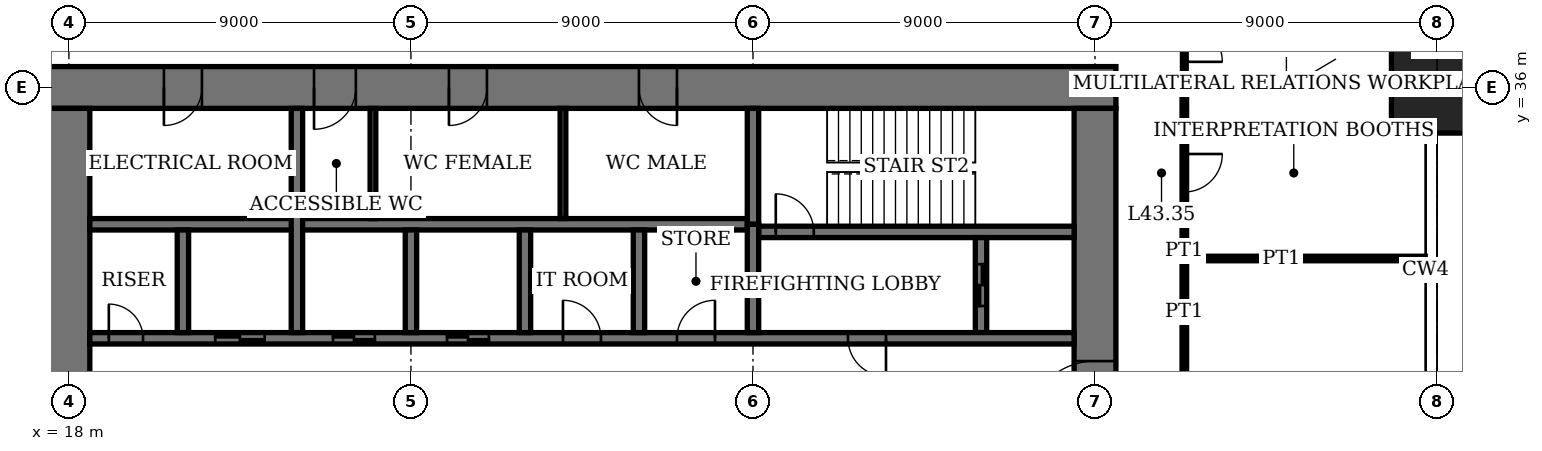
"""IFC4 building model, lengths in metres.
Left out: names, types, materials, properties, quantities, classifications, styles, units other than length and angle.
Written with IfcOpenShell. Run it as: python <this file> out.ifc"""

import sys

from ifc_helpers import new_model, si_unit, direction, frame, frame_2d, origin, origin_2d, place, context, subcontext, project, spatial, rectangle, extrude, element, fill, save


model = new_model("IFC4")
c1 = context("Model", 3, precision=1e-05, world=origin(), true_north=direction((0.0, 1.0)))
c2 = subcontext(c1, "Body", "Model", "MODEL_VIEW")
j1 = project(units=[si_unit("LENGTHUNIT", "METRE"), si_unit("PLANEANGLEUNIT", "RADIAN")], contexts=[c1])
p1 = place(None, origin())
s1 = spatial("IfcSite", under=j1, at=p1, CompositionType="ELEMENT")
p2 = place(p1, origin())
s2 = spatial("IfcBuilding", under=s1, at=p2, CompositionType="ELEMENT")
p3 = place(p2, frame((0.0, 0.0, 178.2)))
s3 = spatial("IfcBuildingStorey", under=s2, at=p3, CompositionType="ELEMENT", Elevation=178.2)
p4 = place(p3, frame((54.0, 36.0, 0.0), z_axis=(0.0, 0.0, 1.0), x_axis=(1.0, 0.0, 0.0)))
e1 = element("IfcColumn", 1, at=p4, inside=s3, PredefinedType="COLUMN", context=c2, shape_type="SweptSolid", body=[
    extrude(rectangle(XDim=2.4, YDim=2.4, at=origin_2d()), origin(), (0.0, 0.0, 1.0), 4.0),
])
p5 = place(p3, frame((45.55, 36.0, 0.0), z_axis=(0.0, 0.0, 1.0), x_axis=(-1.0, 0.0, 0.0)))
e2 = element("IfcWall", 2, at=p5, inside=s3, PredefinedType="SHEAR", context=c2, shape_type="SweptSolid", body=[
    extrude(rectangle(XDim=28.1, YDim=1.1, at=frame_2d((14.05, 0.0))), origin(), (0.0, 0.0, 1.0), 4.0),
])
p6 = place(p5, frame((11.55, 0.0, 0.0)))
e3 = element("IfcOpeningElement", 3, at=p6, cuts=e2, PredefinedType="OPENING", context=c2, shape_type="SweptSolid", body=[
    extrude(rectangle(XDim=1.0, YDim=2.4, at=frame_2d((0.5, 1.2))), frame((0.0, 0.56, 0.0), z_axis=(0.0, -1.0, 0.0), x_axis=(1.0, 0.0, 0.0)), (0.0, 0.0, 1.0), 1.12),
])
p7 = place(p5, frame((16.55, 0.0, 0.0)))
e4 = element("IfcOpeningElement", 4, at=p7, cuts=e2, PredefinedType="OPENING", context=c2, shape_type="SweptSolid", body=[
    extrude(rectangle(XDim=1.0, YDim=2.4, at=frame_2d((0.5, 1.2))), frame((0.0, 0.56, 0.0), z_axis=(0.0, -1.0, 0.0), x_axis=(1.0, 0.0, 0.0)), (0.0, 0.0, 1.0), 1.12),
])
p8 = place(p5, frame((20.0, 0.0, 0.0)))
e5 = element("IfcOpeningElement", 5, at=p8, cuts=e2, PredefinedType="OPENING", context=c2, shape_type="SweptSolid", body=[
    extrude(rectangle(XDim=1.1, YDim=2.4, at=frame_2d((0.55, 1.2))), frame((0.0, 0.56, 0.0), z_axis=(0.0, -1.0, 0.0), x_axis=(1.0, 0.0, 0.0)), (0.0, 0.0, 1.0), 1.12),
])
p9 = place(p5, frame((24.05, 0.0, 0.0)))
e6 = element("IfcOpeningElement", 6, at=p9, cuts=e2, PredefinedType="OPENING", context=c2, shape_type="SweptSolid", body=[
    extrude(rectangle(XDim=1.0, YDim=2.4, at=frame_2d((0.5, 1.2))), frame((0.0, 0.56, 0.0), z_axis=(0.0, -1.0, 0.0), x_axis=(1.0, 0.0, 0.0)), (0.0, 0.0, 1.0), 1.12),
])
p10 = place(p3, frame((18.0, 35.45, 0.0), z_axis=(0.0, 0.0, 1.0), x_axis=(0.0, -1.0, 0.0)))
e7 = element("IfcWall", 7, at=p10, inside=s3, PredefinedType="SHEAR", context=c2, shape_type="SweptSolid", body=[
    extrude(rectangle(XDim=16.9, YDim=1.1, at=frame_2d((8.45, 0.0))), origin(), (0.0, 0.0, 1.0), 4.0),
])
p11 = place(p10, frame((8.45, 0.0, 0.0)))
e8 = element("IfcOpeningElement", 8, at=p11, cuts=e7, PredefinedType="OPENING", context=c2, shape_type="SweptSolid", body=[
    extrude(rectangle(XDim=1.8, YDim=2.4, at=frame_2d((0.9, 1.2))), frame((0.0, 0.56, 0.0), z_axis=(0.0, -1.0, 0.0), x_axis=(1.0, 0.0, 0.0)), (0.0, 0.0, 1.0), 1.12),
])
p12 = place(p3, frame((45.0, 18.55, 0.0), z_axis=(0.0, 0.0, 1.0), x_axis=(0.0, 1.0, 0.0)))
e9 = element("IfcWall", 9, at=p12, inside=s3, PredefinedType="SHEAR", context=c2, shape_type="SweptSolid", body=[
    extrude(rectangle(XDim=16.9, YDim=1.1, at=frame_2d((8.45, 0.0))), origin(), (0.0, 0.0, 1.0), 4.0),
])
p13 = place(p12, frame((8.45, 0.0, 0.0)))
e10 = element("IfcOpeningElement", 10, at=p13, cuts=e9, PredefinedType="OPENING", context=c2, shape_type="SweptSolid", body=[
    extrude(rectangle(XDim=1.8, YDim=2.4, at=frame_2d((0.9, 1.2))), frame((0.0, 0.56, 0.0), z_axis=(0.0, -1.0, 0.0), x_axis=(1.0, 0.0, 0.0)), (0.0, 0.0, 1.0), 1.12),
])
p14 = place(p3, frame((36.15, 32.2, 0.0), z_axis=(0.0, 0.0, 1.0), x_axis=(1.0, 0.0, 0.0)))
e11 = element("IfcWall", 11, at=p14, inside=s3, PredefinedType="SHEAR", context=c2, shape_type="SweptSolid", body=[
    extrude(rectangle(XDim=8.3, YDim=0.3, at=frame_2d((4.15, 0.0))), origin(), (0.0, 0.0, 1.0), 4.0),
])
p15 = place(p14, frame((0.45, 0.0, 0.0)))
e12 = element("IfcOpeningElement", 12, at=p15, cuts=e11, PredefinedType="OPENING", context=c2, shape_type="SweptSolid", body=[
    extrude(rectangle(XDim=1.0, YDim=2.4, at=frame_2d((0.5, 1.2))), frame((0.0, 0.16, 0.0), z_axis=(0.0, -1.0, 0.0), x_axis=(1.0, 0.0, 0.0)), (0.0, 0.0, 1.0), 0.32),
])
p16 = place(p3, frame((36.0, 32.4, 0.0), z_axis=(0.0, 0.0, 1.0), x_axis=(0.0, 1.0, 0.0)))
e13 = element("IfcWall", 13, at=p16, inside=s3, PredefinedType="SHEAR", context=c2, shape_type="SweptSolid", body=[
    extrude(rectangle(XDim=3.05, YDim=0.3, at=frame_2d((1.525, 0.0))), origin(), (0.0, 0.0, 1.0), 4.0),
])
p17 = place(p3, frame((42.0, 29.55, 0.0), z_axis=(0.0, 0.0, 1.0), x_axis=(0.0, 1.0, 0.0)))
e14 = element("IfcWall", 14, at=p17, inside=s3, PredefinedType="SHEAR", context=c2, shape_type="SweptSolid", body=[
    extrude(rectangle(XDim=2.5, YDim=0.3, at=frame_2d((1.25, 0.0))), origin(), (0.0, 0.0, 1.0), 4.0),
])
p18 = place(p17, frame((0.7, 0.0, 0.0)))
e15 = element("IfcOpeningElement", 15, at=p18, cuts=e14, PredefinedType="OPENING", context=c2, shape_type="SweptSolid", body=[
    extrude(rectangle(XDim=1.1, YDim=2.4, at=frame_2d((0.55, 1.2))), frame((0.0, 0.16, 0.0), z_axis=(0.0, -1.0, 0.0), x_axis=(1.0, 0.0, 0.0)), (0.0, 0.0, 1.0), 0.32),
])
p19 = place(p3, frame((18.55, 29.4, 0.0), z_axis=(0.0, 0.0, 1.0), x_axis=(1.0, 0.0, 0.0)))
e16 = element("IfcWall", 16, at=p19, inside=s3, PredefinedType="SHEAR", context=c2, shape_type="SweptSolid", body=[
    extrude(rectangle(XDim=25.9, YDim=0.3, at=frame_2d((12.95, 0.0))), origin(), (0.0, 0.0, 1.0), 4.0),
])
p20 = place(p19, frame((19.95, 0.0, 0.0)))
e17 = element("IfcOpeningElement", 17, at=p20, cuts=e16, PredefinedType="OPENING", context=c2, shape_type="SweptSolid", body=[
    extrude(rectangle(XDim=1.0, YDim=2.4, at=frame_2d((0.5, 1.2))), frame((0.0, 0.16, 0.0), z_axis=(0.0, -1.0, 0.0), x_axis=(1.0, 0.0, 0.0)), (0.0, 0.0, 1.0), 0.32),
])
p21 = place(p19, frame((0.5, 0.0, 0.0)))
e18 = element("IfcOpeningElement", 18, at=p21, cuts=e16, PredefinedType="OPENING", context=c2, shape_type="SweptSolid", body=[
    extrude(rectangle(XDim=0.9, YDim=2.1, at=frame_2d((0.45, 1.05))), frame((0.0, 0.16, 0.0), z_axis=(0.0, -1.0, 0.0), x_axis=(1.0, 0.0, 0.0)), (0.0, 0.0, 1.0), 0.32),
])
p22 = place(p19, frame((15.45, 0.0, 0.0)))
e19 = element("IfcOpeningElement", 19, at=p22, cuts=e16, PredefinedType="OPENING", context=c2, shape_type="SweptSolid", body=[
    extrude(rectangle(XDim=1.0, YDim=2.4, at=frame_2d((0.5, 1.2))), frame((0.0, 0.16, 0.0), z_axis=(0.0, -1.0, 0.0), x_axis=(1.0, 0.0, 0.0)), (0.0, 0.0, 1.0), 0.32),
])
p23 = place(p19, frame((12.45, 0.0, 0.0)))
e20 = element("IfcOpeningElement", 20, at=p23, cuts=e16, PredefinedType="OPENING", context=c2, shape_type="SweptSolid", body=[
    extrude(rectangle(XDim=1.0, YDim=2.4, at=frame_2d((0.5, 1.2))), frame((0.0, 0.16, 0.0), z_axis=(0.0, -1.0, 0.0), x_axis=(1.0, 0.0, 0.0)), (0.0, 0.0, 1.0), 0.32),
])
p24 = place(p19, frame((9.4, 0.0, 0.0)))
e21 = element("IfcOpeningElement", 21, at=p24, cuts=e16, PredefinedType="OPENING", context=c2, shape_type="SweptSolid", body=[
    extrude(rectangle(XDim=1.1, YDim=2.4, at=frame_2d((0.55, 1.2))), frame((0.0, 0.16, 0.0), z_axis=(0.0, -1.0, 0.0), x_axis=(1.0, 0.0, 0.0)), (0.0, 0.0, 1.0), 0.32),
])
p25 = place(p19, frame((6.4, 0.0, 0.0)))
e22 = element("IfcOpeningElement", 22, at=p25, cuts=e16, PredefinedType="OPENING", context=c2, shape_type="SweptSolid", body=[
    extrude(rectangle(XDim=1.1, YDim=2.4, at=frame_2d((0.55, 1.2))), frame((0.0, 0.16, 0.0), z_axis=(0.0, -1.0, 0.0), x_axis=(1.0, 0.0, 0.0)), (0.0, 0.0, 1.0), 0.32),
])
p26 = place(p19, frame((3.3, 0.0, 0.0)))
e23 = element("IfcOpeningElement", 23, at=p26, cuts=e16, PredefinedType="OPENING", context=c2, shape_type="SweptSolid", body=[
    extrude(rectangle(XDim=1.3, YDim=2.4, at=frame_2d((0.65, 1.2))), frame((0.0, 0.16, 0.0), z_axis=(0.0, -1.0, 0.0), x_axis=(1.0, 0.0, 0.0)), (0.0, 0.0, 1.0), 0.32),
])
p27 = place(p3, frame((18.55, 32.4, 0.0), z_axis=(0.0, 0.0, 1.0), x_axis=(1.0, 0.0, 0.0)))
e24 = element("IfcWall", 24, at=p27, inside=s3, PredefinedType="SHEAR", context=c2, shape_type="SweptSolid", body=[
    extrude(rectangle(XDim=17.3, YDim=0.3, at=frame_2d((8.65, 0.0))), origin(), (0.0, 0.0, 1.0), 4.0),
])
for number, where, z_axis, x_axis in (
    (25, (33.0, 29.55, 0.0), (0.0, 0.0, 1.0), (0.0, 1.0, 0.0)),
    (26, (30.0, 29.55, 0.0), (0.0, 0.0, 1.0), (0.0, 1.0, 0.0)),
    (27, (27.0, 29.55, 0.0), (0.0, 0.0, 1.0), (0.0, 1.0, 0.0)),
):
    element("IfcWall", number, at=place(p3, frame(where, z_axis=z_axis, x_axis=x_axis)), inside=s3, PredefinedType="SHEAR", context=c2, shape_type="SweptSolid", body=[
        extrude(rectangle(XDim=2.7, YDim=0.3, at=frame_2d((1.35, 0.0))), origin(), (0.0, 0.0, 1.0), 4.0),
    ])
p28 = place(p3, frame((24.0, 29.55, 0.0), z_axis=(0.0, 0.0, 1.0), x_axis=(0.0, 1.0, 0.0)))
e28 = element("IfcWall", 28, at=p28, inside=s3, PredefinedType="SHEAR", context=c2, shape_type="SweptSolid", body=[
    extrude(rectangle(XDim=5.9, YDim=0.3, at=frame_2d((2.95, 0.0))), origin(), (0.0, 0.0, 1.0), 4.0),
])
p29 = place(p3, frame((21.0, 29.55, 0.0), z_axis=(0.0, 0.0, 1.0), x_axis=(0.0, 1.0, 0.0)))
e29 = element("IfcWall", 29, at=p29, inside=s3, PredefinedType="SHEAR", context=c2, shape_type="SweptSolid", body=[
    extrude(rectangle(XDim=2.7, YDim=0.3, at=frame_2d((1.35, 0.0))), origin(), (0.0, 0.0, 1.0), 4.0),
])
p30 = place(p3, frame((36.0, 29.55, 0.0), z_axis=(0.0, 0.0, 1.0), x_axis=(0.0, 1.0, 0.0)))
e30 = element("IfcWall", 30, at=p30, inside=s3, PredefinedType="SHEAR", context=c2, shape_type="SweptSolid", body=[
    extrude(rectangle(XDim=2.85, YDim=0.3, at=frame_2d((1.425, 0.0))), origin(), (0.0, 0.0, 1.0), 4.0),
])
p31 = place(p3, frame((47.35, 31.5, 0.0), z_axis=(0.0, 0.0, 1.0), x_axis=(1.0, 0.0, 0.0)))
e31 = element("IfcWall", 31, at=p31, inside=s3, PredefinedType="PARTITIONING", context=c2, shape_type="SweptSolid", body=[
    extrude(rectangle(XDim=6.34, YDim=0.12, at=frame_2d((3.17, 0.0))), origin(), (0.0, 0.0, 1.0), 3.1),
])
p32 = place(p3, frame((47.35, 36.0, 0.0), z_axis=(0.0, 0.0, 1.0), x_axis=(1.0, 0.0, 0.0)))
e32 = element("IfcWall", 32, at=p32, inside=s3, PredefinedType="PARTITIONING", context=c2, shape_type="SweptSolid", body=[
    extrude(rectangle(XDim=5.45, YDim=0.12, at=frame_2d((2.725, 0.0))), origin(), (0.0, 0.0, 1.0), 3.05),
])
p33 = place(p3, frame((47.35, 22.5, 0.0), z_axis=(0.0, 0.0, 1.0), x_axis=(0.0, 1.0, 0.0)))
e33 = element("IfcWall", 33, at=p33, inside=s3, PredefinedType="PARTITIONING", context=c2, shape_type="SweptSolid", body=[
    extrude(rectangle(XDim=9.0, YDim=0.12, at=frame_2d((4.5, 0.0))), origin(), (0.0, 0.0, 1.0), 3.75),
])
p34 = place(p33, frame((4.0, 0.0, 0.0)))
e34 = element("IfcOpeningElement", 34, at=p34, cuts=e33, PredefinedType="OPENING", context=c2, shape_type="SweptSolid", body=[
    extrude(rectangle(XDim=1.0, YDim=2.4, at=frame_2d((0.5, 1.2))), frame((0.0, 0.07, 0.0), z_axis=(0.0, -1.0, 0.0), x_axis=(1.0, 0.0, 0.0)), (0.0, 0.0, 1.0), 0.14),
])
p35 = place(p3, frame((47.35, 31.5, 0.0), z_axis=(0.0, 0.0, 1.0), x_axis=(0.0, 1.0, 0.0)))
e35 = element("IfcWall", 35, at=p35, inside=s3, PredefinedType="PARTITIONING", context=c2, shape_type="SweptSolid", body=[
    extrude(rectangle(XDim=4.5, YDim=0.12, at=frame_2d((2.25, 0.0))), origin(), (0.0, 0.0, 1.0), 3.75),
])
p36 = place(p35, frame((1.75, 0.0, 0.0)))
e36 = element("IfcOpeningElement", 36, at=p36, cuts=e35, PredefinedType="OPENING", context=c2, shape_type="SweptSolid", body=[
    extrude(rectangle(XDim=1.0, YDim=2.4, at=frame_2d((0.5, 1.2))), frame((0.0, 0.07, 0.0), z_axis=(0.0, -1.0, 0.0), x_axis=(1.0, 0.0, 0.0)), (0.0, 0.0, 1.0), 0.14),
])
p37 = place(p3, frame((47.35, 36.0, 0.0), z_axis=(0.0, 0.0, 1.0), x_axis=(0.0, 1.0, 0.0)))
e37 = element("IfcWall", 37, at=p37, inside=s3, PredefinedType="PARTITIONING", context=c2, shape_type="SweptSolid", body=[
    extrude(rectangle(XDim=2.35, YDim=0.1, at=frame_2d((1.175, 0.0))), origin(), (0.0, 0.0, 1.0), 3.75),
])
p38 = place(p37, frame((0.675, 0.0, 0.0)))
e38 = element("IfcOpeningElement", 38, at=p38, cuts=e37, PredefinedType="OPENING", context=c2, shape_type="SweptSolid", body=[
    extrude(rectangle(XDim=1.0, YDim=2.4, at=frame_2d((0.5, 1.2))), frame((0.0, 0.06, 0.0), z_axis=(0.0, -1.0, 0.0), x_axis=(1.0, 0.0, 0.0)), (0.0, 0.0, 1.0), 0.12),
])
for number, where, z_axis, x_axis in (
    (39, (31.0, 32.55, 0.0), (0.0, 0.0, 1.0), (0.0, 1.0, 0.0)),
    (40, (26.0, 32.55, 0.0), (0.0, 0.0, 1.0), (0.0, 1.0, 0.0)),
):
    element("IfcWall", number, at=place(p3, frame(where, z_axis=z_axis, x_axis=x_axis)), inside=s3, PredefinedType="PARTITIONING", context=c2, shape_type="SweptSolid", body=[
        extrude(rectangle(XDim=2.9, YDim=0.15, at=frame_2d((1.45, 0.0))), origin(), (0.0, 0.0, 1.0), 3.75),
    ])
p39 = place(p13, origin())
e41 = element("IfcDoor", 41, at=p39, inside=s3, OperationType="DOUBLE_DOOR_DOUBLE_SWING", PredefinedType="DOOR", context=c2, shape_type="SweptSolid", body=[
    extrude(rectangle(XDim=1.8, YDim=2.4, at=frame_2d((0.9, 1.2))), frame((0.0, 0.03, 0.0), z_axis=(0.0, -1.0, 0.0), x_axis=(1.0, 0.0, 0.0)), (0.0, 0.0, 1.0), 0.06),
    extrude(rectangle(XDim=0.04, YDim=2.4, at=frame_2d((0.02, 1.2))), frame((0.0, 0.55, 0.0), z_axis=(0.0, -1.0, 0.0), x_axis=(1.0, 0.0, 0.0)), (0.0, 0.0, 1.0), 1.1),
    extrude(rectangle(XDim=0.04, YDim=2.4, at=frame_2d((1.78, 1.2))), frame((0.0, 0.55, 0.0), z_axis=(0.0, -1.0, 0.0), x_axis=(1.0, 0.0, 0.0)), (0.0, 0.0, 1.0), 1.1),
    extrude(rectangle(XDim=1.8, YDim=0.04, at=frame_2d((0.9, 2.38))), frame((0.0, 0.55, 0.0), z_axis=(0.0, -1.0, 0.0), x_axis=(1.0, 0.0, 0.0)), (0.0, 0.0, 1.0), 1.1),
])
fill(e10, e41)
p40 = place(p6, origin())
e42 = element("IfcDoor", 42, at=p40, inside=s3, OperationType="SINGLE_SWING_RIGHT", PredefinedType="DOOR", context=c2, shape_type="SweptSolid", body=[
    extrude(rectangle(XDim=1.0, YDim=2.4, at=frame_2d((0.5, 1.2))), frame((0.0, 0.025, 0.0), z_axis=(0.0, -1.0, 0.0), x_axis=(1.0, 0.0, 0.0)), (0.0, 0.0, 1.0), 0.05),
    extrude(rectangle(XDim=0.04, YDim=2.4, at=frame_2d((0.02, 1.2))), frame((0.0, 0.4, 0.0), z_axis=(0.0, -1.0, 0.0), x_axis=(1.0, 0.0, 0.0)), (0.0, 0.0, 1.0), 0.8),
    extrude(rectangle(XDim=0.04, YDim=2.4, at=frame_2d((0.98, 1.2))), frame((0.0, 0.4, 0.0), z_axis=(0.0, -1.0, 0.0), x_axis=(1.0, 0.0, 0.0)), (0.0, 0.0, 1.0), 0.8),
    extrude(rectangle(XDim=1.0, YDim=0.04, at=frame_2d((0.5, 2.38))), frame((0.0, 0.4, 0.0), z_axis=(0.0, -1.0, 0.0), x_axis=(1.0, 0.0, 0.0)), (0.0, 0.0, 1.0), 0.8),
])
fill(e3, e42)
p41 = place(p7, origin())
e43 = element("IfcDoor", 43, at=p41, inside=s3, OperationType="SINGLE_SWING_LEFT", PredefinedType="DOOR", context=c2, shape_type="SweptSolid", body=[
    extrude(rectangle(XDim=1.0, YDim=2.4, at=frame_2d((0.5, 1.2))), frame((0.0, 0.025, 0.0), z_axis=(0.0, -1.0, 0.0), x_axis=(1.0, 0.0, 0.0)), (0.0, 0.0, 1.0), 0.05),
    extrude(rectangle(XDim=0.04, YDim=2.4, at=frame_2d((0.02, 1.2))), frame((0.0, 0.4, 0.0), z_axis=(0.0, -1.0, 0.0), x_axis=(1.0, 0.0, 0.0)), (0.0, 0.0, 1.0), 0.8),
    extrude(rectangle(XDim=0.04, YDim=2.4, at=frame_2d((0.98, 1.2))), frame((0.0, 0.4, 0.0), z_axis=(0.0, -1.0, 0.0), x_axis=(1.0, 0.0, 0.0)), (0.0, 0.0, 1.0), 0.8),
    extrude(rectangle(XDim=1.0, YDim=0.04, at=frame_2d((0.5, 2.38))), frame((0.0, 0.4, 0.0), z_axis=(0.0, -1.0, 0.0), x_axis=(1.0, 0.0, 0.0)), (0.0, 0.0, 1.0), 0.8),
])
fill(e4, e43)
p42 = place(p8, origin())
e44 = element("IfcDoor", 44, at=p42, inside=s3, OperationType="SINGLE_SWING_LEFT", PredefinedType="DOOR", context=c2, shape_type="SweptSolid", body=[
    extrude(rectangle(XDim=1.1, YDim=2.4, at=frame_2d((0.55, 1.2))), frame((0.0, 0.025, 0.0), z_axis=(0.0, -1.0, 0.0), x_axis=(1.0, 0.0, 0.0)), (0.0, 0.0, 1.0), 0.05),
    extrude(rectangle(XDim=0.04, YDim=2.4, at=frame_2d((0.02, 1.2))), frame((0.0, 0.44, 0.0), z_axis=(0.0, -1.0, 0.0), x_axis=(1.0, 0.0, 0.0)), (0.0, 0.0, 1.0), 0.88),
    extrude(rectangle(XDim=0.04, YDim=2.4, at=frame_2d((1.08, 1.2))), frame((0.0, 0.44, 0.0), z_axis=(0.0, -1.0, 0.0), x_axis=(1.0, 0.0, 0.0)), (0.0, 0.0, 1.0), 0.88),
    extrude(rectangle(XDim=1.1, YDim=0.04, at=frame_2d((0.55, 2.38))), frame((0.0, 0.44, 0.0), z_axis=(0.0, -1.0, 0.0), x_axis=(1.0, 0.0, 0.0)), (0.0, 0.0, 1.0), 0.88),
])
fill(e5, e44)
p43 = place(p9, origin())
e45 = element("IfcDoor", 45, at=p43, inside=s3, OperationType="SINGLE_SWING_LEFT", PredefinedType="DOOR", context=c2, shape_type="SweptSolid", body=[
    extrude(rectangle(XDim=1.0, YDim=2.4, at=frame_2d((0.5, 1.2))), frame((0.0, 0.025, 0.0), z_axis=(0.0, -1.0, 0.0), x_axis=(1.0, 0.0, 0.0)), (0.0, 0.0, 1.0), 0.05),
    extrude(rectangle(XDim=0.04, YDim=2.4, at=frame_2d((0.02, 1.2))), frame((0.0, 0.4, 0.0), z_axis=(0.0, -1.0, 0.0), x_axis=(1.0, 0.0, 0.0)), (0.0, 0.0, 1.0), 0.8),
    extrude(rectangle(XDim=0.04, YDim=2.4, at=frame_2d((0.98, 1.2))), frame((0.0, 0.4, 0.0), z_axis=(0.0, -1.0, 0.0), x_axis=(1.0, 0.0, 0.0)), (0.0, 0.0, 1.0), 0.8),
    extrude(rectangle(XDim=1.0, YDim=0.04, at=frame_2d((0.5, 2.38))), frame((0.0, 0.4, 0.0), z_axis=(0.0, -1.0, 0.0), x_axis=(1.0, 0.0, 0.0)), (0.0, 0.0, 1.0), 0.8),
])
fill(e6, e45)
p44 = place(p15, origin())
e46 = element("IfcDoor", 46, at=p44, inside=s3, OperationType="SINGLE_SWING_RIGHT", PredefinedType="DOOR", context=c2, shape_type="SweptSolid", body=[
    extrude(rectangle(XDim=1.0, YDim=2.4, at=frame_2d((0.5, 1.2))), frame((0.0, 0.03, 0.0), z_axis=(0.0, -1.0, 0.0), x_axis=(1.0, 0.0, 0.0)), (0.0, 0.0, 1.0), 0.06),
])
fill(e12, e46)
p45 = place(p20, origin())
e47 = element("IfcDoor", 47, at=p45, inside=s3, OperationType="SINGLE_SWING_RIGHT", PredefinedType="DOOR", context=c2, shape_type="SweptSolid", body=[
    extrude(rectangle(XDim=1.0, YDim=2.4, at=frame_2d((0.5, 1.2))), frame((0.0, 0.03, 0.0), z_axis=(0.0, -1.0, 0.0), x_axis=(1.0, 0.0, 0.0)), (0.0, 0.0, 1.0), 0.06),
])
fill(e17, e47)
p46 = place(p21, origin())
e48 = element("IfcDoor", 48, at=p46, inside=s3, OperationType="SINGLE_SWING_RIGHT", PredefinedType="DOOR", context=c2, shape_type="SweptSolid", body=[
    extrude(rectangle(XDim=0.9, YDim=2.1, at=frame_2d((0.45, 1.05))), frame((0.0, 0.03, 0.0), z_axis=(0.0, -1.0, 0.0), x_axis=(1.0, 0.0, 0.0)), (0.0, 0.0, 1.0), 0.06),
])
fill(e18, e48)
p47 = place(p36, origin())
e49 = element("IfcDoor", 49, at=p47, inside=s3, OperationType="SINGLE_SWING_RIGHT", PredefinedType="DOOR", context=c2, shape_type="SweptSolid", body=[
    extrude(rectangle(XDim=1.0, YDim=2.4, at=frame_2d((0.5, 1.2))), frame((0.0, 0.025, 0.0), z_axis=(0.0, -1.0, 0.0), x_axis=(1.0, 0.0, 0.0)), (0.0, 0.0, 1.0), 0.05),
])
fill(e36, e49)
p48 = place(p38, origin())
e50 = element("IfcDoor", 50, at=p48, inside=s3, OperationType="SINGLE_SWING_LEFT", PredefinedType="DOOR", context=c2, shape_type="SweptSolid", body=[
    extrude(rectangle(XDim=1.0, YDim=2.4, at=frame_2d((0.5, 1.2))), frame((0.0, 0.02, 0.0), z_axis=(0.0, -1.0, 0.0), x_axis=(1.0, 0.0, 0.0)), (0.0, 0.0, 1.0), 0.04),
])
fill(e38, e50)
p49 = place(p22, origin())
e51 = element("IfcDoor", 51, at=p49, inside=s3, OperationType="SINGLE_SWING_LEFT", PredefinedType="DOOR", context=c2, shape_type="SweptSolid", body=[
    extrude(rectangle(XDim=1.0, YDim=2.4, at=frame_2d((0.5, 1.2))), frame((0.0, 0.03, 0.0), z_axis=(0.0, -1.0, 0.0), x_axis=(1.0, 0.0, 0.0)), (0.0, 0.0, 1.0), 0.06),
])
fill(e19, e51)
p50 = place(p23, origin())
e52 = element("IfcDoor", 52, at=p50, inside=s3, OperationType="SINGLE_SWING_RIGHT", PredefinedType="DOOR", context=c2, shape_type="SweptSolid", body=[
    extrude(rectangle(XDim=1.0, YDim=2.4, at=frame_2d((0.5, 1.2))), frame((0.0, 0.03, 0.0), z_axis=(0.0, -1.0, 0.0), x_axis=(1.0, 0.0, 0.0)), (0.0, 0.0, 1.0), 0.06),
])
fill(e20, e52)
p51 = place(p24, origin())
e53 = element("IfcDoor", 53, at=p51, inside=s3, OperationType="DOUBLE_DOOR_SLIDING", PredefinedType="DOOR", context=c2, shape_type="SweptSolid", body=[
    extrude(rectangle(XDim=1.1, YDim=2.4, at=frame_2d((0.55, 1.2))), frame((0.0, 0.02, 0.0), z_axis=(0.0, -1.0, 0.0), x_axis=(1.0, 0.0, 0.0)), (0.0, 0.0, 1.0), 0.04),
])
fill(e21, e53)
p52 = place(p25, origin())
e54 = element("IfcDoor", 54, at=p52, inside=s3, OperationType="DOUBLE_DOOR_SLIDING", PredefinedType="DOOR", context=c2, shape_type="SweptSolid", body=[
    extrude(rectangle(XDim=1.1, YDim=2.4, at=frame_2d((0.55, 1.2))), frame((0.0, 0.02, 0.0), z_axis=(0.0, -1.0, 0.0), x_axis=(1.0, 0.0, 0.0)), (0.0, 0.0, 1.0), 0.04),
])
fill(e22, e54)
p53 = place(p26, origin())
e55 = element("IfcDoor", 55, at=p53, inside=s3, OperationType="DOUBLE_DOOR_SLIDING", PredefinedType="DOOR", context=c2, shape_type="SweptSolid", body=[
    extrude(rectangle(XDim=1.3, YDim=2.4, at=frame_2d((0.65, 1.2))), frame((0.0, 0.02, 0.0), z_axis=(0.0, -1.0, 0.0), x_axis=(1.0, 0.0, 0.0)), (0.0, 0.0, 1.0), 0.04),
])
fill(e23, e55)
p54 = place(p18, origin())
e56 = element("IfcDoor", 56, at=p54, inside=s3, OperationType="DOUBLE_DOOR_SLIDING", PredefinedType="DOOR", context=c2, shape_type="SweptSolid", body=[
    extrude(rectangle(XDim=1.1, YDim=2.4, at=frame_2d((0.55, 1.2))), frame((0.0, 0.03, 0.0), z_axis=(0.0, -1.0, 0.0), x_axis=(1.0, 0.0, 0.0)), (0.0, 0.0, 1.0), 0.06),
])
fill(e15, e56)
save(model, sys.argv[1])
